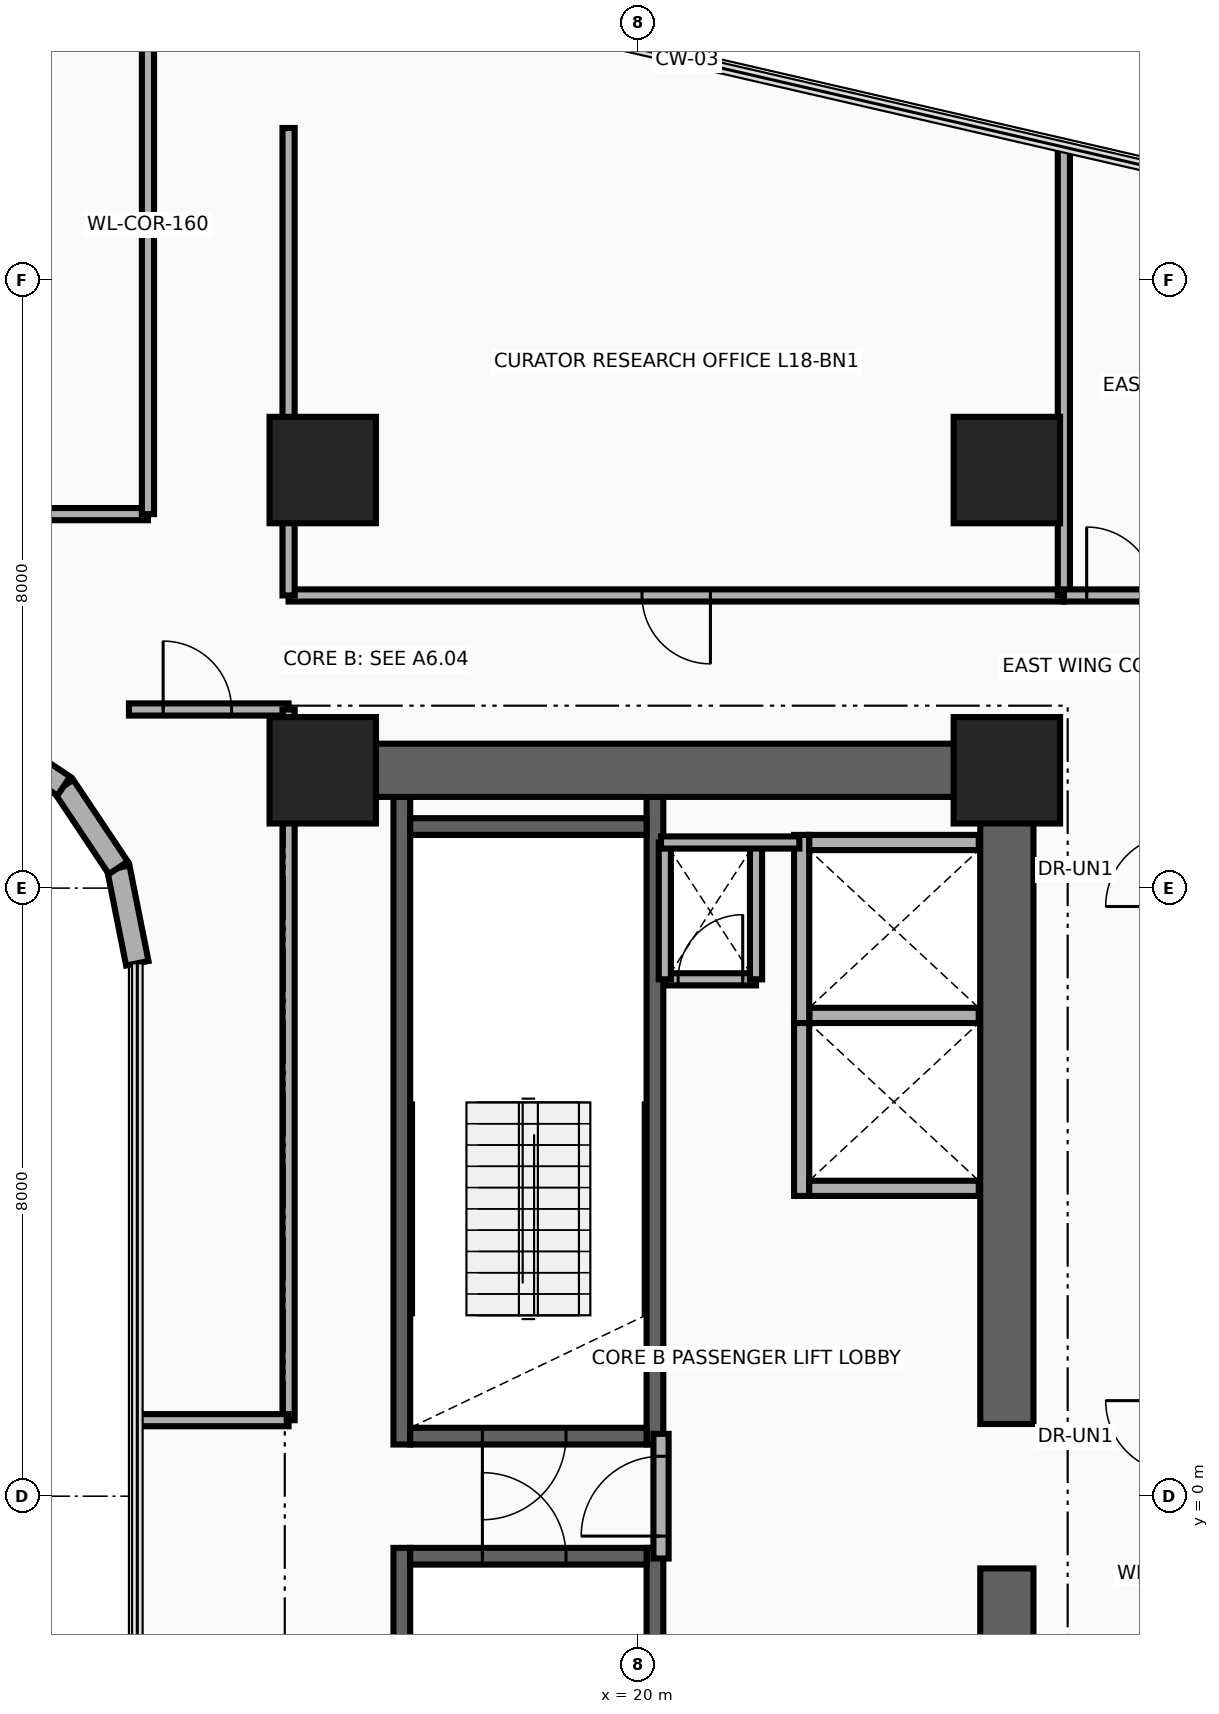
"""IFC4 building model, lengths in metres.
Left out: names, types, materials, properties, quantities, classifications, styles, units other than length and angle.
Written with IfcOpenShell. Run it as: python <this file> out.ifc"""

import sys

from ifc_helpers import new_model, si_unit, direction, frame, frame_2d, origin, origin_2d, place, context, subcontext, project, spatial, rectangle, extrude, source, transform, mapped, element, fill, save


model = new_model("IFC4")
c1 = context("Model", 3, precision=1e-05, world=origin(), true_north=direction((0.0, 1.0)))
c2 = subcontext(c1, "Body", "Model", "MODEL_VIEW")
j1 = project(units=[si_unit("LENGTHUNIT", "METRE"), si_unit("PLANEANGLEUNIT", "RADIAN")], contexts=[c1])
p1 = place(None, origin())
s1 = spatial("IfcSite", under=j1, at=p1, CompositionType="ELEMENT")
p2 = place(p1, origin())
s2 = spatial("IfcBuilding", under=s1, at=p2, CompositionType="ELEMENT")
p3 = place(p2, frame((0.0, 0.0, 74.1)))
s3 = spatial("IfcBuildingStorey", under=s2, at=p3, CompositionType="ELEMENT", Elevation=74.1)
for number, where, z_axis, x_axis in (
    (1, (16.89, 0.68, 0.0), (0.0, 0.0, 1.0), (0.0, 1.0, 0.0)),
    (2, (20.22, 0.68, 0.0), (0.0, 0.0, 1.0), (0.0, 1.0, 0.0)),
):
    element("IfcWall", number, at=place(p3, frame(where, z_axis=z_axis, x_axis=x_axis)), inside=s3, PredefinedType="SHEAR", context=c2, shape_type="SweptSolid", body=[
        extrude(rectangle(XDim=8.52, YDim=0.22, at=frame_2d((4.26, 0.0))), origin(), (0.0, 0.0, 1.0), 3.46),
    ])
p4 = place(p3, frame((17.0, 0.79, 0.0), z_axis=(0.0, 0.0, 1.0), x_axis=(1.0, 0.0, 0.0)))
e3 = element("IfcWall", 3, at=p4, inside=s3, PredefinedType="SHEAR", context=c2, shape_type="SweptSolid", body=[
    extrude(rectangle(XDim=3.11, YDim=0.22, at=frame_2d((1.555, 0.0))), origin(), (0.0, 0.0, 1.0), 3.46),
])
p5 = place(p4, frame((0.95, 0.0, 0.0)))
e4 = element("IfcOpeningElement", 4, at=p5, cuts=e3, PredefinedType="OPENING", context=c2, shape_type="SweptSolid", body=[
    extrude(rectangle(XDim=1.1, YDim=2.15, at=frame_2d((0.55, 1.075))), frame((0.0, 0.125, 0.0), z_axis=(0.0, -1.0, 0.0), x_axis=(1.0, 0.0, 0.0)), (0.0, 0.0, 1.0), 0.25),
])
p6 = place(p3, frame((17.0, 8.81, 0.0), z_axis=(0.0, 0.0, 1.0), x_axis=(1.0, 0.0, 0.0)))
e5 = element("IfcWall", 5, at=p6, inside=s3, PredefinedType="SHEAR", context=c2, shape_type="SweptSolid", body=[
    extrude(rectangle(XDim=3.11, YDim=0.22, at=frame_2d((1.555, 0.0))), origin(), (0.0, 0.0, 1.0), 3.46),
])
for number, where, z_axis, x_axis in (
    (6, (16.89, -9.2, 0.0), (0.0, 0.0, 1.0), (0.0, 1.0, 0.0)),
    (7, (20.22, -9.2, 0.0), (0.0, 0.0, 1.0), (0.0, 1.0, 0.0)),
):
    element("IfcWall", number, at=place(p3, frame(where, z_axis=z_axis, x_axis=x_axis)), inside=s3, PredefinedType="SHEAR", context=c2, shape_type="SweptSolid", body=[
        extrude(rectangle(XDim=8.52, YDim=0.22, at=frame_2d((4.26, 0.0))), origin(), (0.0, 0.0, 1.0), 3.46),
    ])
p7 = place(p3, frame((17.0, -0.79, 0.0), z_axis=(0.0, 0.0, 1.0), x_axis=(1.0, 0.0, 0.0)))
e8 = element("IfcWall", 8, at=p7, inside=s3, PredefinedType="SHEAR", context=c2, shape_type="SweptSolid", body=[
    extrude(rectangle(XDim=3.11, YDim=0.22, at=frame_2d((1.555, 0.0))), origin(), (0.0, 0.0, 1.0), 3.46),
])
p8 = place(p7, frame((0.95, 0.0, 0.0)))
e9 = element("IfcOpeningElement", 9, at=p8, cuts=e8, PredefinedType="OPENING", context=c2, shape_type="SweptSolid", body=[
    extrude(rectangle(XDim=1.1, YDim=2.15, at=frame_2d((0.55, 1.075))), frame((0.0, 0.125, 0.0), z_axis=(0.0, -1.0, 0.0), x_axis=(1.0, 0.0, 0.0)), (0.0, 0.0, 1.0), 0.25),
])
for number, where, z_axis, x_axis in (
    (10, (24.85, -9.9, 0.0), (0.0, 0.0, 1.0), (0.0, 1.0, 0.0)),
    (11, (24.85, 0.95, 0.0), (0.0, 0.0, 1.0), (0.0, 1.0, 0.0)),
):
    element("IfcWall", number, at=place(p3, frame(where, z_axis=z_axis, x_axis=x_axis)), inside=s3, PredefinedType="SHEAR", context=c2, shape_type="SweptSolid", body=[
        extrude(rectangle(XDim=8.95, YDim=0.7, at=frame_2d((4.475, 0.0))), origin(), (0.0, 0.0, 1.0), 3.46),
    ])
p9 = place(p3, frame((15.85, 9.55, 0.0), z_axis=(0.0, 0.0, 1.0), x_axis=(1.0, 0.0, 0.0)))
e12 = element("IfcWall", 12, at=p9, inside=s3, PredefinedType="SHEAR", context=c2, shape_type="SweptSolid", body=[
    extrude(rectangle(XDim=9.0, YDim=0.7, at=frame_2d((4.5, 0.0))), origin(), (0.0, 0.0, 1.0), 3.46),
])
m1 = source(origin(), c2, "Body", "SweptSolid", [
    extrude(rectangle(XDim=1.4, YDim=1.4, at=origin_2d()), origin(), (0.0, 0.0, 1.0), 3.7),
])
for number, where, z_axis, x_axis in (
    (13, (15.85, 9.55, 0.0), (0.0, 0.0, 1.0), (1.0, 0.0, 0.0)),
    (14, (24.85, 9.55, 0.0), (0.0, 0.0, 1.0), (1.0, 0.0, 0.0)),
    (15, (15.85, 13.5, 0.0), (0.0, 0.0, 1.0), (1.0, 0.0, 0.0)),
    (16, (24.85, 13.5, 0.0), (0.0, 0.0, 1.0), (1.0, 0.0, 0.0)),
):
    element("IfcColumn", number, at=place(p3, frame(where, z_axis=z_axis, x_axis=x_axis)), inside=s3, PredefinedType="COLUMN", context=c2, shape_type="MappedRepresentation", body=[
        mapped(m1, transform((0.0, 0.0, 0.0), x_axis=(1.0, 0.0, 0.0), y_axis=(0.0, 1.0, 0.0), z_axis=(0.0, 0.0, 1.0), scale=1.0)),
    ])
p10 = place(p3, frame((13.41, 7.011, 0.0), z_axis=(0.0, 0.0, 1.0), x_axis=(-0.195090163074, 0.980785312019, 0.0)))
e17 = element("IfcWall", 17, at=p10, inside=s3, PredefinedType="SOLIDWALL", context=c2, shape_type="SweptSolid", body=[
    extrude(rectangle(XDim=1.281, YDim=0.3, at=frame_2d((0.641, 0.0))), origin(), (0.0, 0.0, 1.0), 3.46),
])
for number, where, z_axis, x_axis in (
    (18, (13.16, 8.268, 0.0), (0.0, 0.0, 1.0), (-0.556, 0.831, 0.0)),
    (19, (12.442, 9.342, 0.0), (0.0, 0.0, 1.0), (-0.831, 0.556, 0.0)),
):
    element("IfcWall", number, at=place(p3, frame(where, z_axis=z_axis, x_axis=x_axis)), inside=s3, PredefinedType="SOLIDWALL", context=c2, shape_type="SweptSolid", body=[
        extrude(rectangle(XDim=1.292, YDim=0.3, at=frame_2d((0.646, 0.0))), origin(), (0.0, 0.0, 1.0), 3.46),
    ])
p11 = place(p3, frame((22.15, 3.95, 0.0), z_axis=(0.0, 0.0, 1.0), x_axis=(0.0, 1.0, 0.0)))
e20 = element("IfcWall", 20, at=p11, inside=s3, PredefinedType="MOVABLE", context=c2, shape_type="SweptSolid", body=[
    extrude(rectangle(XDim=2.475, YDim=0.2, at=frame_2d((1.238, 0.0))), origin(), (0.0, 0.0, 1.0), 3.46),
])
for number, where, z_axis, x_axis in (
    (21, (22.25, 4.05, 0.0), (0.0, 0.0, 1.0), (1.0, 0.0, 0.0)),
    (22, (22.25, 6.325, 0.0), (0.0, 0.0, 1.0), (1.0, 0.0, 0.0)),
):
    element("IfcWall", number, at=place(p3, frame(where, z_axis=z_axis, x_axis=x_axis)), inside=s3, PredefinedType="MOVABLE", context=c2, shape_type="SweptSolid", body=[
        extrude(rectangle(XDim=2.23, YDim=0.2, at=frame_2d((1.115, 0.0))), origin(), (0.0, 0.0, 1.0), 2.245),
    ])
p12 = place(p3, frame((22.15, 6.225, 0.0), z_axis=(0.0, 0.0, 1.0), x_axis=(0.0, 1.0, 0.0)))
e23 = element("IfcWall", 23, at=p12, inside=s3, PredefinedType="MOVABLE", context=c2, shape_type="SweptSolid", body=[
    extrude(rectangle(XDim=2.475, YDim=0.2, at=frame_2d((1.237, 0.0))), origin(), (0.0, 0.0, 1.0), 3.46),
])
p13 = place(p3, frame((22.25, 8.6, 0.0), z_axis=(0.0, 0.0, 1.0), x_axis=(1.0, 0.0, 0.0)))
e24 = element("IfcWall", 24, at=p13, inside=s3, PredefinedType="MOVABLE", context=c2, shape_type="SweptSolid", body=[
    extrude(rectangle(XDim=2.23, YDim=0.2, at=frame_2d((1.115, 0.0))), origin(), (0.0, 0.0, 1.0), 2.245),
])
p14 = place(p3, frame((20.3, -0.82, 0.0), z_axis=(0.0, 0.0, 1.0), x_axis=(0.0, 1.0, 0.0)))
e25 = element("IfcWall", 25, at=p14, inside=s3, PredefinedType="PARTITIONING", context=c2, shape_type="SweptSolid", body=[
    extrude(rectangle(XDim=1.64, YDim=0.2, at=frame_2d((0.82, 0.0))), origin(), (0.0, 0.0, 1.0), 3.46),
])
p15 = place(p14, frame((0.295, 0.0, 0.0)))
e26 = element("IfcOpeningElement", 26, at=p15, cuts=e25, PredefinedType="OPENING", context=c2, shape_type="SweptSolid", body=[
    extrude(rectangle(XDim=1.05, YDim=2.15, at=frame_2d((0.525, 1.075))), frame((0.0, 0.115, 0.0), z_axis=(0.0, -1.0, 0.0), x_axis=(1.0, 0.0, 0.0)), (0.0, 0.0, 1.0), 0.23),
])
p16 = place(p3, frame((20.35, 6.8, 0.0), z_axis=(0.0, 0.0, 1.0), x_axis=(1.0, 0.0, 0.0)))
e27 = element("IfcWall", 27, at=p16, inside=s3, PredefinedType="PARTITIONING", context=c2, shape_type="SweptSolid", body=[
    extrude(rectangle(XDim=1.2, YDim=0.16, at=frame_2d((0.6, 0.0))), origin(), (0.0, 0.0, 1.0), 3.46),
])
p17 = place(p16, frame((0.175, 0.0, 0.0)))
e28 = element("IfcOpeningElement", 28, at=p17, cuts=e27, PredefinedType="OPENING", context=c2, shape_type="SweptSolid", body=[
    extrude(rectangle(XDim=0.85, YDim=2.05, at=frame_2d((0.425, 1.025))), frame((0.0, 0.095, 0.0), z_axis=(0.0, -1.0, 0.0), x_axis=(1.0, 0.0, 0.0)), (0.0, 0.0, 1.0), 0.19),
])
for number, where, z_axis, x_axis in (
    (29, (21.55, 6.8, 0.0), (0.0, 0.0, 1.0), (0.0, 1.0, 0.0)),
    (30, (20.35, 6.8, 0.0), (0.0, 0.0, 1.0), (0.0, 1.0, 0.0)),
):
    element("IfcWall", number, at=place(p3, frame(where, z_axis=z_axis, x_axis=x_axis)), inside=s3, PredefinedType="PARTITIONING", context=c2, shape_type="SweptSolid", body=[
        extrude(rectangle(XDim=1.8, YDim=0.16, at=frame_2d((0.9, 0.0))), origin(), (0.0, 0.0, 1.0), 3.46),
    ])
p18 = place(p3, frame((20.3, 8.6, 0.0), z_axis=(0.0, 0.0, 1.0), x_axis=(1.0, 0.0, 0.0)))
e31 = element("IfcWall", 31, at=p18, inside=s3, PredefinedType="PARTITIONING", context=c2, shape_type="SweptSolid", body=[
    extrude(rectangle(XDim=1.82, YDim=0.16, at=frame_2d((0.91, 0.0))), origin(), (0.0, 0.0, 1.0), 3.46),
])
p19 = place(p3, frame((-31.89, 12.92, 0.0), z_axis=(0.0, 0.0, 1.0), x_axis=(1.0, 0.0, 0.0)))
e32 = element("IfcWall", 32, at=p19, inside=s3, PredefinedType="PARTITIONING", context=c2, shape_type="SweptSolid", body=[
    extrude(rectangle(XDim=45.44, YDim=0.16, at=frame_2d((22.72, 0.0))), origin(), (0.0, 0.0, 1.0), 2.583),
])
p20 = place(p19, frame((10.448, 0.0, 0.0)))
e33 = element("IfcOpeningElement", 33, at=p20, cuts=e32, PredefinedType="OPENING", context=c2, shape_type="SweptSolid", body=[
    extrude(rectangle(XDim=0.9, YDim=2.1, at=frame_2d((0.45, 1.05))), frame((0.0, 0.095, 0.0), z_axis=(0.0, -1.0, 0.0), x_axis=(1.0, 0.0, 0.0)), (0.0, 0.0, 1.0), 0.19),
])
p21 = place(p19, frame((33.167, 0.0, 0.0)))
e34 = element("IfcOpeningElement", 34, at=p21, cuts=e32, PredefinedType="OPENING", context=c2, shape_type="SweptSolid", body=[
    extrude(rectangle(XDim=0.9, YDim=2.1, at=frame_2d((0.45, 1.05))), frame((0.0, 0.095, 0.0), z_axis=(0.0, -1.0, 0.0), x_axis=(1.0, 0.0, 0.0)), (0.0, 0.0, 1.0), 0.19),
])
p22 = place(p3, frame((13.55, 12.92, 0.0), z_axis=(0.0, 0.0, 1.0), x_axis=(0.0, 1.0, 0.0)))
e35 = element("IfcWall", 35, at=p22, inside=s3, PredefinedType="PARTITIONING", context=c2, shape_type="SweptSolid", body=[
    extrude(rectangle(XDim=7.609, YDim=0.16, at=frame_2d((3.805, 0.0))), origin(), (0.0, 0.0, 1.0), 2.583),
])
p23 = place(p3, frame((15.4, 11.85, 0.0), z_axis=(0.0, 0.0, 1.0), x_axis=(1.0, 0.0, 0.0)))
e36 = element("IfcWall", 36, at=p23, inside=s3, PredefinedType="PARTITIONING", context=c2, shape_type="SweptSolid", body=[
    extrude(rectangle(XDim=10.2, YDim=0.16, at=frame_2d((5.1, 0.0))), origin(), (0.0, 0.0, 1.0), 2.834),
])
p24 = place(p23, frame((4.65, 0.0, 0.0)))
e37 = element("IfcOpeningElement", 37, at=p24, cuts=e36, PredefinedType="OPENING", context=c2, shape_type="SweptSolid", body=[
    extrude(rectangle(XDim=0.9, YDim=2.1, at=frame_2d((0.45, 1.05))), frame((0.0, 0.095, 0.0), z_axis=(0.0, -1.0, 0.0), x_axis=(1.0, 0.0, 0.0)), (0.0, 0.0, 1.0), 0.19),
])
p25 = place(p3, frame((15.4, 11.85, 0.0), z_axis=(0.0, 0.0, 1.0), x_axis=(0.0, 1.0, 0.0)))
e38 = element("IfcWall", 38, at=p25, inside=s3, PredefinedType="PARTITIONING", context=c2, shape_type="SweptSolid", body=[
    extrude(rectangle(XDim=6.15, YDim=0.16, at=frame_2d((3.075, 0.0))), origin(), (0.0, 0.0, 1.0), 2.583),
])
p26 = place(p3, frame((25.6, 11.85, 0.0), z_axis=(0.0, 0.0, 1.0), x_axis=(0.0, 1.0, 0.0)))
e39 = element("IfcWall", 39, at=p26, inside=s3, PredefinedType="PARTITIONING", context=c2, shape_type="SweptSolid", body=[
    extrude(rectangle(XDim=5.898, YDim=0.16, at=frame_2d((2.949, 0.0))), origin(), (0.0, 0.0, 1.0), 2.583),
])
p27 = place(p3, frame((25.6, 11.85, 0.0), z_axis=(0.0, 0.0, 1.0), x_axis=(1.0, 0.0, 0.0)))
e40 = element("IfcWall", 40, at=p27, inside=s3, PredefinedType="PARTITIONING", context=c2, shape_type="SweptSolid", body=[
    extrude(rectangle(XDim=5.79, YDim=0.16, at=frame_2d((2.895, 0.0))), origin(), (0.0, 0.0, 1.0), 2.896),
])
p28 = place(p27, frame((0.3, 0.0, 0.0)))
e41 = element("IfcOpeningElement", 41, at=p28, cuts=e40, PredefinedType="OPENING", context=c2, shape_type="SweptSolid", body=[
    extrude(rectangle(XDim=0.9, YDim=2.1, at=frame_2d((0.45, 1.05))), frame((0.0, 0.095, 0.0), z_axis=(0.0, -1.0, 0.0), x_axis=(1.0, 0.0, 0.0)), (0.0, 0.0, 1.0), 0.19),
])
p29 = place(p3, frame((13.3, 10.35, 0.0), z_axis=(0.0, 0.0, 1.0), x_axis=(1.0, 0.0, 0.0)))
e42 = element("IfcWall", 42, at=p29, inside=s3, PredefinedType="PARTITIONING", context=c2, shape_type="SweptSolid", body=[
    extrude(rectangle(XDim=2.1, YDim=0.16, at=frame_2d((1.05, 0.0))), origin(), (0.0, 0.0, 1.0), 2.583),
])
p30 = place(p29, frame((0.45, 0.0, 0.0)))
e43 = element("IfcOpeningElement", 43, at=p30, cuts=e42, PredefinedType="OPENING", context=c2, shape_type="SweptSolid", body=[
    extrude(rectangle(XDim=0.9, YDim=2.1, at=frame_2d((0.45, 1.05))), frame((0.0, 0.095, 0.0), z_axis=(0.0, -1.0, 0.0), x_axis=(1.0, 0.0, 0.0)), (0.0, 0.0, 1.0), 0.19),
])
p31 = place(p3, frame((15.4, 1.0, 0.0), z_axis=(0.0, 0.0, 1.0), x_axis=(0.0, 1.0, 0.0)))
e44 = element("IfcWall", 44, at=p31, inside=s3, PredefinedType="PARTITIONING", context=c2, shape_type="SweptSolid", body=[
    extrude(rectangle(XDim=9.35, YDim=0.16, at=frame_2d((4.675, 0.0))), origin(), (0.0, 0.0, 1.0), 2.245),
])
p32 = place(p3, frame((13.41, 1.0, 0.0), z_axis=(0.0, 0.0, 1.0), x_axis=(1.0, 0.0, 0.0)))
e45 = element("IfcWall", 45, at=p32, inside=s3, PredefinedType="PARTITIONING", context=c2, shape_type="SweptSolid", body=[
    extrude(rectangle(XDim=1.99, YDim=0.16, at=frame_2d((0.995, 0.0))), origin(), (0.0, 0.0, 1.0), 2.245),
])
p33 = place(p15, origin())
e46 = element("IfcDoor", 46, at=p33, inside=s3, OperationType="SINGLE_SWING_RIGHT", PredefinedType="DOOR", context=c2, shape_type="SweptSolid", body=[
    extrude(rectangle(XDim=1.05, YDim=2.15, at=frame_2d((0.525, 1.075))), frame((0.0, 0.025, 0.0), z_axis=(0.0, -1.0, 0.0), x_axis=(1.0, 0.0, 0.0)), (0.0, 0.0, 1.0), 0.05),
])
fill(e26, e46)
p34 = place(p5, frame((1.1, 0.0, 0.0), z_axis=(0.0, 0.0, 1.0), x_axis=(-1.0, 0.0, 0.0)))
e47 = element("IfcDoor", 47, at=p34, inside=s3, OperationType="SINGLE_SWING_LEFT", PredefinedType="DOOR", context=c2, shape_type="SweptSolid", body=[
    extrude(rectangle(XDim=1.1, YDim=2.15, at=frame_2d((0.55, 1.075))), frame((0.0, 0.025, 0.0), z_axis=(0.0, -1.0, 0.0), x_axis=(1.0, 0.0, 0.0)), (0.0, 0.0, 1.0), 0.05),
])
fill(e4, e47)
p35 = place(p8, origin())
e48 = element("IfcDoor", 48, at=p35, inside=s3, OperationType="SINGLE_SWING_RIGHT", PredefinedType="DOOR", context=c2, shape_type="SweptSolid", body=[
    extrude(rectangle(XDim=1.1, YDim=2.15, at=frame_2d((0.55, 1.075))), frame((0.0, 0.025, 0.0), z_axis=(0.0, -1.0, 0.0), x_axis=(1.0, 0.0, 0.0)), (0.0, 0.0, 1.0), 0.05),
])
fill(e9, e48)
p36 = place(p17, origin())
e49 = element("IfcDoor", 49, at=p36, inside=s3, OperationType="SINGLE_SWING_LEFT", PredefinedType="DOOR", context=c2, shape_type="SweptSolid", body=[
    extrude(rectangle(XDim=0.85, YDim=2.05, at=frame_2d((0.425, 1.025))), frame((0.0, 0.025, 0.0), z_axis=(0.0, -1.0, 0.0), x_axis=(1.0, 0.0, 0.0)), (0.0, 0.0, 1.0), 0.05),
])
fill(e28, e49)
p37 = place(p24, frame((0.9, 0.0, 0.0), z_axis=(0.0, 0.0, 1.0), x_axis=(-1.0, 0.0, 0.0)))
e50 = element("IfcDoor", 50, at=p37, inside=s3, OperationType="SINGLE_SWING_LEFT", PredefinedType="DOOR", context=c2, shape_type="SweptSolid", body=[
    extrude(rectangle(XDim=0.9, YDim=2.1, at=frame_2d((0.45, 1.05))), frame((0.0, 0.025, 0.0), z_axis=(0.0, -1.0, 0.0), x_axis=(1.0, 0.0, 0.0)), (0.0, 0.0, 1.0), 0.05),
])
fill(e37, e50)
p38 = place(p28, origin())
e51 = element("IfcDoor", 51, at=p38, inside=s3, OperationType="SINGLE_SWING_LEFT", PredefinedType="DOOR", context=c2, shape_type="SweptSolid", body=[
    extrude(rectangle(XDim=0.9, YDim=2.1, at=frame_2d((0.45, 1.05))), frame((0.0, 0.025, 0.0), z_axis=(0.0, -1.0, 0.0), x_axis=(1.0, 0.0, 0.0)), (0.0, 0.0, 1.0), 0.05),
])
fill(e41, e51)
p39 = place(p30, origin())
e52 = element("IfcDoor", 52, at=p39, inside=s3, OperationType="SINGLE_SWING_RIGHT", PredefinedType="DOOR", context=c2, shape_type="SweptSolid", body=[
    extrude(rectangle(XDim=0.9, YDim=2.1, at=frame_2d((0.45, 1.05))), frame((0.0, 0.025, 0.0), z_axis=(0.0, -1.0, 0.0), x_axis=(1.0, 0.0, 0.0)), (0.0, 0.0, 1.0), 0.05),
])
fill(e43, e52)
save(model, sys.argv[1])
